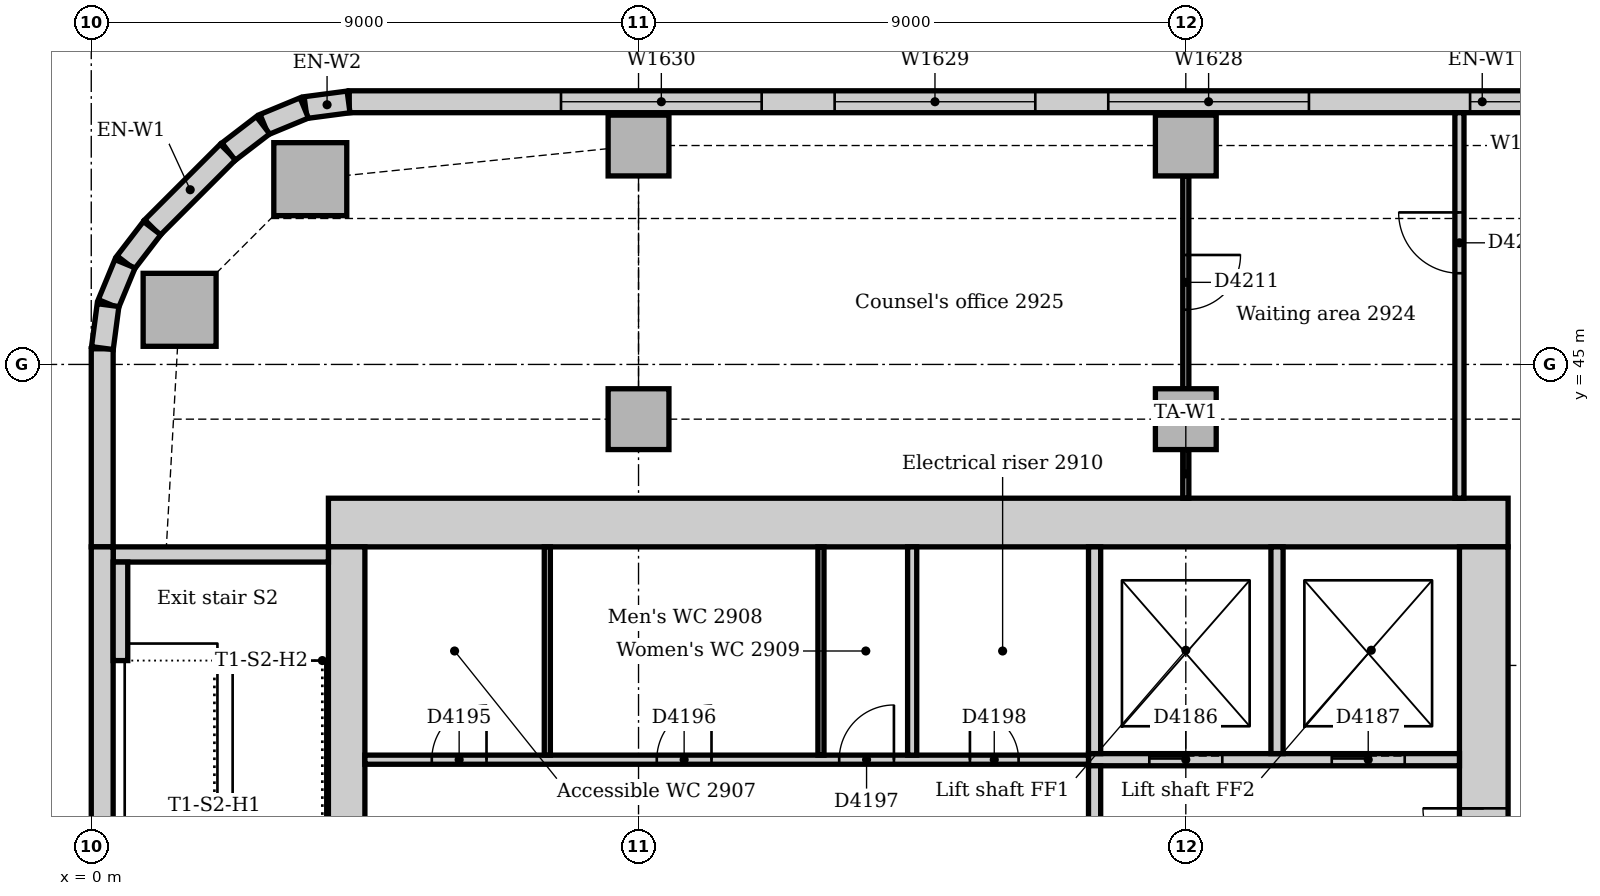
"""IFC4 building model, lengths in metres.
Left out: names, types, materials, properties, quantities, classifications, styles, units other than length and angle.
Written with IfcOpenShell. Run it as: python <this file> out.ifc"""

import sys

from ifc_helpers import new_model, si_unit, direction, frame, frame_2d, origin, origin_2d, place, context, subcontext, project, spatial, rectangle, extrude, element, fill, save


model = new_model("IFC4")
c1 = context("Model", 3, precision=1e-05, world=origin(), true_north=direction((0.0, 1.0)))
c2 = subcontext(c1, "Body", "Model", "MODEL_VIEW")
j1 = project(units=[si_unit("LENGTHUNIT", "METRE"), si_unit("PLANEANGLEUNIT", "RADIAN")], contexts=[c1])
p1 = place(None, origin())
s1 = spatial("IfcSite", under=j1, at=p1, CompositionType="ELEMENT")
p2 = place(p1, origin())
s2 = spatial("IfcBuilding", under=s1, at=p2, CompositionType="ELEMENT")
p3 = place(p2, frame((0.0, 0.0, 124.0)))
s3 = spatial("IfcBuildingStorey", under=s2, at=p3, CompositionType="ELEMENT", Elevation=124.0)
p4 = place(p3, frame((23.3, 42.4, 0.0), z_axis=(0.0, 0.0, 1.0), x_axis=(-1.0, 0.0, 0.0)))
e1 = element("IfcWall", 1, at=p4, inside=s3, PredefinedType="SOLIDWALL", context=c2, shape_type="SweptSolid", body=[
    extrude(rectangle(XDim=19.4, YDim=0.8, at=frame_2d((9.7, 0.0))), origin(), (0.0, 0.0, 1.0), 4.0),
])
p5 = place(p3, frame((22.9, 31.5, 0.0), z_axis=(0.0, 0.0, 1.0), x_axis=(0.0, 1.0, 0.0)))
e2 = element("IfcWall", 2, at=p5, inside=s3, PredefinedType="SOLIDWALL", context=c2, shape_type="SweptSolid", body=[
    extrude(rectangle(XDim=10.5, YDim=0.8, at=frame_2d((5.25, 0.0))), origin(), (0.0, 0.0, 1.0), 4.0),
])
p6 = place(p5, frame((3.15, 0.0, 0.0)))
e3 = element("IfcOpeningElement", 3, at=p6, cuts=e2, PredefinedType="OPENING", context=c2, shape_type="SweptSolid", body=[
    extrude(rectangle(XDim=1.0, YDim=2.1, at=frame_2d((0.5, 1.05))), frame((0.0, 0.41, 0.0), z_axis=(0.0, -1.0, 0.0), x_axis=(1.0, 0.0, 0.0)), (0.0, 0.0, 1.0), 0.82),
])
p7 = place(p5, frame((5.2, 0.0, 0.0)))
e4 = element("IfcOpeningElement", 4, at=p7, cuts=e2, PredefinedType="OPENING", context=c2, shape_type="SweptSolid", body=[
    extrude(rectangle(XDim=1.0, YDim=2.1, at=frame_2d((0.5, 1.05))), frame((0.0, 0.41, 0.0), z_axis=(0.0, -1.0, 0.0), x_axis=(1.0, 0.0, 0.0)), (0.0, 0.0, 1.0), 0.82),
])
p8 = place(p3, frame((4.2, 42.0, 0.0), z_axis=(0.0, 0.0, 1.0), x_axis=(0.0, -1.0, 0.0)))
e5 = element("IfcWall", 5, at=p8, inside=s3, PredefinedType="SOLIDWALL", context=c2, shape_type="SweptSolid", body=[
    extrude(rectangle(XDim=10.5, YDim=0.6, at=frame_2d((5.25, 0.0))), origin(), (0.0, 0.0, 1.0), 4.0),
])
p9 = place(p8, frame((5.3, 0.0, 0.0)))
e6 = element("IfcOpeningElement", 6, at=p9, cuts=e5, PredefinedType="OPENING", context=c2, shape_type="SweptSolid", body=[
    extrude(rectangle(XDim=1.0, YDim=2.1, at=frame_2d((0.5, 1.05))), frame((0.0, 0.31, 0.0), z_axis=(0.0, -1.0, 0.0), x_axis=(1.0, 0.0, 0.0)), (0.0, 0.0, 1.0), 0.62),
])
p10 = place(p3, frame((3.9, 41.875, 0.0), z_axis=(0.0, 0.0, 1.0), x_axis=(-1.0, 0.0, 0.0)))
e7 = element("IfcWall", 7, at=p10, inside=s3, PredefinedType="SOLIDWALL", context=c2, shape_type="SweptSolid", body=[
    extrude(rectangle(XDim=3.54, YDim=0.25, at=frame_2d((1.77, 0.0))), origin(), (0.0, 0.0, 1.0), 4.0),
])
for number, where, z_axis, x_axis in (
    (8, (3.602, 48.047, 0.0), (0.0, 0.0, 1.0), (1.0, 0.0, 0.0)),
    (9, (1.453, 45.898, 0.0), (0.0, 0.0, 1.0), (1.0, 0.0, 0.0)),
):
    element("IfcColumn", number, at=place(p3, frame(where, z_axis=z_axis, x_axis=x_axis)), inside=s3, PredefinedType="COLUMN", context=c2, shape_type="SweptSolid", body=[
        extrude(rectangle(XDim=1.2, YDim=1.2, at=origin_2d()), origin(), (0.0, 0.0, 1.0), 3.85),
    ])
for number, where, z_axis, x_axis in (
    (10, (9.0, 48.6, 0.0), (0.0, 0.0, 1.0), (1.0, 0.0, 0.0)),
    (11, (18.0, 48.6, 0.0), (0.0, 0.0, 1.0), (1.0, 0.0, 0.0)),
    (12, (9.0, 44.1, 0.0), (0.0, 0.0, 1.0), (1.0, 0.0, 0.0)),
    (13, (18.0, 44.1, 0.0), (0.0, 0.0, 1.0), (1.0, 0.0, 0.0)),
):
    element("IfcColumn", number, at=place(p3, frame(where, z_axis=z_axis, x_axis=x_axis)), inside=s3, PredefinedType="COLUMN", context=c2, shape_type="SweptSolid", body=[
        extrude(rectangle(XDim=1.0, YDim=1.0, at=origin_2d()), origin(), (0.0, 0.0, 1.0), 3.85),
    ])
p11 = place(p3, frame((41.507, 49.32, 0.0), z_axis=(0.0, 0.0, 1.0), x_axis=(-1.0, 0.0, 0.0)))
e14 = element("IfcWall", 14, at=p11, inside=s3, PredefinedType="STANDARD", context=c2, shape_type="SweptSolid", body=[
    extrude(rectangle(XDim=37.265, YDim=0.36, at=frame_2d((18.632, 0.0))), origin(), (0.0, 0.0, 1.0), 3.85),
])
p12 = place(p11, frame((3.482, 0.0, 0.9)))
e15 = element("IfcOpeningElement", 15, at=p12, cuts=e14, PredefinedType="OPENING", context=c2, shape_type="SweptSolid", body=[
    extrude(rectangle(XDim=3.3, YDim=1.6, at=frame_2d((1.65, 0.8))), frame((0.0, 0.19, 0.0), z_axis=(0.0, -1.0, 0.0), x_axis=(1.0, 0.0, 0.0)), (0.0, 0.0, 1.0), 0.38),
])
p13 = place(p11, frame((7.982, 0.0, 0.9)))
e16 = element("IfcOpeningElement", 16, at=p13, cuts=e14, PredefinedType="OPENING", context=c2, shape_type="SweptSolid", body=[
    extrude(rectangle(XDim=3.3, YDim=1.6, at=frame_2d((1.65, 0.8))), frame((0.0, 0.19, 0.0), z_axis=(0.0, -1.0, 0.0), x_axis=(1.0, 0.0, 0.0)), (0.0, 0.0, 1.0), 0.38),
])
p14 = place(p11, frame((12.482, 0.0, 0.9)))
e17 = element("IfcOpeningElement", 17, at=p14, cuts=e14, PredefinedType="OPENING", context=c2, shape_type="SweptSolid", body=[
    extrude(rectangle(XDim=3.3, YDim=1.6, at=frame_2d((1.65, 0.8))), frame((0.0, 0.19, 0.0), z_axis=(0.0, -1.0, 0.0), x_axis=(1.0, 0.0, 0.0)), (0.0, 0.0, 1.0), 0.38),
])
p15 = place(p11, frame((17.032, 0.0, 0.9)))
e18 = element("IfcOpeningElement", 18, at=p15, cuts=e14, PredefinedType="OPENING", context=c2, shape_type="SweptSolid", body=[
    extrude(rectangle(XDim=1.8, YDim=1.6, at=frame_2d((0.9, 0.8))), frame((0.0, 0.19, 0.0), z_axis=(0.0, -1.0, 0.0), x_axis=(1.0, 0.0, 0.0)), (0.0, 0.0, 1.0), 0.38),
])
p16 = place(p11, frame((21.482, 0.0, 0.9)))
e19 = element("IfcOpeningElement", 19, at=p16, cuts=e14, PredefinedType="OPENING", context=c2, shape_type="SweptSolid", body=[
    extrude(rectangle(XDim=3.3, YDim=1.6, at=frame_2d((1.65, 0.8))), frame((0.0, 0.19, 0.0), z_axis=(0.0, -1.0, 0.0), x_axis=(1.0, 0.0, 0.0)), (0.0, 0.0, 1.0), 0.38),
])
p17 = place(p11, frame((25.982, 0.0, 0.9)))
e20 = element("IfcOpeningElement", 20, at=p17, cuts=e14, PredefinedType="OPENING", context=c2, shape_type="SweptSolid", body=[
    extrude(rectangle(XDim=3.3, YDim=1.6, at=frame_2d((1.65, 0.8))), frame((0.0, 0.19, 0.0), z_axis=(0.0, -1.0, 0.0), x_axis=(1.0, 0.0, 0.0)), (0.0, 0.0, 1.0), 0.38),
])
p18 = place(p11, frame((30.482, 0.0, 0.9)))
e21 = element("IfcOpeningElement", 21, at=p18, cuts=e14, PredefinedType="OPENING", context=c2, shape_type="SweptSolid", body=[
    extrude(rectangle(XDim=3.3, YDim=1.6, at=frame_2d((1.65, 0.8))), frame((0.0, 0.19, 0.0), z_axis=(0.0, -1.0, 0.0), x_axis=(1.0, 0.0, 0.0)), (0.0, 0.0, 1.0), 0.38),
])
p19 = place(p3, frame((2.249, 48.494, 0.0), z_axis=(0.0, 0.0, 1.0), x_axis=(-0.707106781187, -0.707106781187, 0.0)))
e22 = element("IfcWall", 22, at=p19, inside=s3, PredefinedType="STANDARD", context=c2, shape_type="SweptSolid", body=[
    extrude(rectangle(XDim=1.757, YDim=0.36, at=frame_2d((0.879, 0.0))), origin(), (0.0, 0.0, 1.0), 3.85),
])
p20 = place(p3, frame((0.18, 45.257, 0.0), z_axis=(0.0, 0.0, 1.0), x_axis=(0.0, -1.0, 0.0)))
e23 = element("IfcWall", 23, at=p20, inside=s3, PredefinedType="STANDARD", context=c2, shape_type="SweptSolid", body=[
    extrude(rectangle(XDim=3.257, YDim=0.36, at=frame_2d((1.629, 0.0))), origin(), (0.0, 0.0, 1.0), 3.85),
])
p21 = place(p3, frame((0.18, 42.0, 0.0), z_axis=(0.0, 0.0, 1.0), x_axis=(0.0, -1.0, 0.0)))
e24 = element("IfcWall", 24, at=p21, inside=s3, PredefinedType="STANDARD", context=c2, shape_type="SweptSolid", body=[
    extrude(rectangle(XDim=6.75, YDim=0.36, at=frame_2d((3.375, 0.0))), origin(), (0.0, 0.0, 1.0), 3.85),
])
for number, where, z_axis, x_axis in (
    (25, (4.231, 49.317, 0.0), (0.0, 0.0, 1.0), (-0.991, -0.131, 0.0)),
    (26, (3.503, 49.218, 0.0), (0.0, 0.0, 1.0), (-0.924, -0.383, 0.0)),
):
    element("IfcWall", number, at=place(p3, frame(where, z_axis=z_axis, x_axis=x_axis)), inside=s3, PredefinedType="STANDARD", context=c2, shape_type="SweptSolid", body=[
        extrude(rectangle(XDim=0.713, YDim=0.36, at=frame_2d((0.356, 0.0))), origin(), (0.0, 0.0, 1.0), 3.85),
    ])
for number, where, z_axis, x_axis in (
    (27, (2.825, 48.934, 0.0), (0.0, 0.0, 1.0), (-0.793, -0.609, 0.0)),
    (28, (1.0, 47.241, 0.0), (0.0, 0.0, 1.0), (-0.609, -0.793, 0.0)),
):
    element("IfcWall", number, at=place(p3, frame(where, z_axis=z_axis, x_axis=x_axis)), inside=s3, PredefinedType="STANDARD", context=c2, shape_type="SweptSolid", body=[
        extrude(rectangle(XDim=0.713, YDim=0.36, at=frame_2d((0.357, 0.0))), origin(), (0.0, 0.0, 1.0), 3.85),
    ])
for number, where, z_axis, x_axis in (
    (29, (0.555, 46.656, 0.0), (0.0, 0.0, 1.0), (-0.383, -0.924, 0.0)),
    (30, (0.276, 45.976, 0.0), (0.0, 0.0, 1.0), (-0.131, -0.991, 0.0)),
):
    element("IfcWall", number, at=place(p3, frame(where, z_axis=z_axis, x_axis=x_axis)), inside=s3, PredefinedType="STANDARD", context=c2, shape_type="SweptSolid", body=[
        extrude(rectangle(XDim=0.713, YDim=0.36, at=frame_2d((0.356, 0.0))), origin(), (0.0, 0.0, 1.0), 3.85),
    ])
p22 = place(p3, frame((0.48, 40.13, 0.0), z_axis=(0.0, 0.0, 1.0), x_axis=(0.0, 1.0, 0.0)))
e31 = element("IfcWall", 31, at=p22, inside=s3, PredefinedType="STANDARD", context=c2, shape_type="SweptSolid", body=[
    extrude(rectangle(XDim=1.62, YDim=0.24, at=frame_2d((0.81, 0.0))), origin(), (0.0, 0.0, 1.0), 4.0),
])
p23 = place(p3, frame((16.4, 38.5, 0.0), z_axis=(0.0, 0.0, 1.0), x_axis=(1.0, 0.0, 0.0)))
e32 = element("IfcWall", 32, at=p23, inside=s3, PredefinedType="PARTITIONING", context=c2, shape_type="SweptSolid", body=[
    extrude(rectangle(XDim=6.1, YDim=0.2, at=frame_2d((3.05, 0.0))), origin(), (0.0, 0.0, 1.0), 3.85),
])
p24 = place(p23, frame((1.0, 0.0, 0.0)))
e33 = element("IfcOpeningElement", 33, at=p24, cuts=e32, PredefinedType="OPENING", context=c2, shape_type="SweptSolid", body=[
    extrude(rectangle(XDim=1.2, YDim=2.1, at=frame_2d((0.6, 1.05))), frame((0.0, 0.11, 0.0), z_axis=(0.0, -1.0, 0.0), x_axis=(1.0, 0.0, 0.0)), (0.0, 0.0, 1.0), 0.22),
])
p25 = place(p23, frame((4.0, 0.0, 0.0)))
e34 = element("IfcOpeningElement", 34, at=p25, cuts=e32, PredefinedType="OPENING", context=c2, shape_type="SweptSolid", body=[
    extrude(rectangle(XDim=1.2, YDim=2.1, at=frame_2d((0.6, 1.05))), frame((0.0, 0.11, 0.0), z_axis=(0.0, -1.0, 0.0), x_axis=(1.0, 0.0, 0.0)), (0.0, 0.0, 1.0), 0.22),
])
p26 = place(p3, frame((16.5, 35.85, 0.0), z_axis=(0.0, 0.0, 1.0), x_axis=(0.0, 1.0, 0.0)))
e35 = element("IfcWall", 35, at=p26, inside=s3, PredefinedType="PARTITIONING", context=c2, shape_type="SweptSolid", body=[
    extrude(rectangle(XDim=2.55, YDim=0.2, at=frame_2d((1.275, 0.0))), origin(), (0.0, 0.0, 1.0), 3.85),
])
for number, where, z_axis, x_axis in (
    (36, (16.5, 38.6, 0.0), (0.0, 0.0, 1.0), (0.0, 1.0, 0.0)),
    (37, (19.5, 38.6, 0.0), (0.0, 0.0, 1.0), (0.0, 1.0, 0.0)),
):
    element("IfcWall", number, at=place(p3, frame(where, z_axis=z_axis, x_axis=x_axis)), inside=s3, PredefinedType="PARTITIONING", context=c2, shape_type="SweptSolid", body=[
        extrude(rectangle(XDim=3.4, YDim=0.2, at=frame_2d((1.7, 0.0))), origin(), (0.0, 0.0, 1.0), 3.85),
    ])
p27 = place(p3, frame((4.5, 38.5, 0.0), z_axis=(0.0, 0.0, 1.0), x_axis=(1.0, 0.0, 0.0)))
e38 = element("IfcWall", 38, at=p27, inside=s3, PredefinedType="PARTITIONING", context=c2, shape_type="SweptSolid", body=[
    extrude(rectangle(XDim=11.9, YDim=0.15, at=frame_2d((5.95, 0.0))), origin(), (0.0, 0.0, 1.0), 3.85),
])
p28 = place(p27, frame((1.1, 0.0, 0.0)))
e39 = element("IfcOpeningElement", 39, at=p28, cuts=e38, PredefinedType="OPENING", context=c2, shape_type="SweptSolid", body=[
    extrude(rectangle(XDim=0.9, YDim=2.1, at=frame_2d((0.45, 1.05))), frame((0.0, 0.085, 0.0), z_axis=(0.0, -1.0, 0.0), x_axis=(1.0, 0.0, 0.0)), (0.0, 0.0, 1.0), 0.17),
])
p29 = place(p27, frame((4.8, 0.0, 0.0)))
e40 = element("IfcOpeningElement", 40, at=p29, cuts=e38, PredefinedType="OPENING", context=c2, shape_type="SweptSolid", body=[
    extrude(rectangle(XDim=0.9, YDim=2.1, at=frame_2d((0.45, 1.05))), frame((0.0, 0.085, 0.0), z_axis=(0.0, -1.0, 0.0), x_axis=(1.0, 0.0, 0.0)), (0.0, 0.0, 1.0), 0.17),
])
p30 = place(p27, frame((7.8, 0.0, 0.0)))
e41 = element("IfcOpeningElement", 41, at=p30, cuts=e38, PredefinedType="OPENING", context=c2, shape_type="SweptSolid", body=[
    extrude(rectangle(XDim=0.9, YDim=2.1, at=frame_2d((0.45, 1.05))), frame((0.0, 0.085, 0.0), z_axis=(0.0, -1.0, 0.0), x_axis=(1.0, 0.0, 0.0)), (0.0, 0.0, 1.0), 0.17),
])
p31 = place(p27, frame((9.95, 0.0, 0.0)))
e42 = element("IfcOpeningElement", 42, at=p31, cuts=e38, PredefinedType="OPENING", context=c2, shape_type="SweptSolid", body=[
    extrude(rectangle(XDim=0.8, YDim=2.1, at=frame_2d((0.4, 1.05))), frame((0.0, 0.085, 0.0), z_axis=(0.0, -1.0, 0.0), x_axis=(1.0, 0.0, 0.0)), (0.0, 0.0, 1.0), 0.17),
])
p32 = place(p3, frame((22.5, 42.8, 0.0), z_axis=(0.0, 0.0, 1.0), x_axis=(0.0, 1.0, 0.0)))
e43 = element("IfcWall", 43, at=p32, inside=s3, PredefinedType="PARTITIONING", context=c2, shape_type="SweptSolid", body=[
    extrude(rectangle(XDim=6.34, YDim=0.15, at=frame_2d((3.17, 0.0))), origin(), (0.0, 0.0, 1.0), 3.85),
])
p33 = place(p32, frame((3.7, 0.0, 0.0)))
e44 = element("IfcOpeningElement", 44, at=p33, cuts=e43, PredefinedType="OPENING", context=c2, shape_type="SweptSolid", body=[
    extrude(rectangle(XDim=1.0, YDim=2.1, at=frame_2d((0.5, 1.05))), frame((0.0, 0.085, 0.0), z_axis=(0.0, -1.0, 0.0), x_axis=(1.0, 0.0, 0.0)), (0.0, 0.0, 1.0), 0.17),
])
p34 = place(p3, frame((13.5, 38.575, 0.0), z_axis=(0.0, 0.0, 1.0), x_axis=(0.0, 1.0, 0.0)))
e45 = element("IfcWall", 45, at=p34, inside=s3, PredefinedType="PARTITIONING", context=c2, shape_type="SweptSolid", body=[
    extrude(rectangle(XDim=3.425, YDim=0.15, at=frame_2d((1.712, 0.0))), origin(), (0.0, 0.0, 1.0), 3.85),
])
p35 = place(p3, frame((18.0, 42.8, 0.0), z_axis=(0.0, 0.0, 1.0), x_axis=(0.0, 1.0, 0.0)))
e46 = element("IfcWall", 46, at=p35, inside=s3, PredefinedType="PARTITIONING", context=c2, shape_type="SweptSolid", body=[
    extrude(rectangle(XDim=0.8, YDim=0.1, at=frame_2d((0.4, 0.0))), origin(), (0.0, 0.0, 1.0), 3.85),
])
p36 = place(p3, frame((18.0, 44.6, 0.0), z_axis=(0.0, 0.0, 1.0), x_axis=(0.0, 1.0, 0.0)))
e47 = element("IfcWall", 47, at=p36, inside=s3, PredefinedType="PARTITIONING", context=c2, shape_type="SweptSolid", body=[
    extrude(rectangle(XDim=3.5, YDim=0.1, at=frame_2d((1.75, 0.0))), origin(), (0.0, 0.0, 1.0), 3.652),
])
p37 = place(p36, frame((1.3, 0.0, 0.0)))
e48 = element("IfcOpeningElement", 48, at=p37, cuts=e47, PredefinedType="OPENING", context=c2, shape_type="SweptSolid", body=[
    extrude(rectangle(XDim=0.9, YDim=2.1, at=frame_2d((0.45, 1.05))), frame((0.0, 0.06, 0.0), z_axis=(0.0, -1.0, 0.0), x_axis=(1.0, 0.0, 0.0)), (0.0, 0.0, 1.0), 0.12),
])
for number, where, z_axis, x_axis in (
    (49, (7.5, 38.575, 0.0), (0.0, 0.0, 1.0), (0.0, 1.0, 0.0)),
    (50, (12.0, 38.575, 0.0), (0.0, 0.0, 1.0), (0.0, 1.0, 0.0)),
):
    element("IfcWall", number, at=place(p3, frame(where, z_axis=z_axis, x_axis=x_axis)), inside=s3, PredefinedType="PARTITIONING", context=c2, shape_type="SweptSolid", body=[
        extrude(rectangle(XDim=3.425, YDim=0.1, at=frame_2d((1.712, 0.0))), origin(), (0.0, 0.0, 1.0), 3.85),
    ])
p38 = place(p15, origin())
e51 = element("IfcWindow", 51, at=p38, inside=s3, PartitioningType="SINGLE_PANEL", PredefinedType="WINDOW", context=c2, shape_type="SweptSolid", body=[
    extrude(rectangle(XDim=1.8, YDim=1.6, at=frame_2d((0.9, 0.8))), frame((0.0, 0.13, 0.0), z_axis=(0.0, -1.0, 0.0), x_axis=(1.0, 0.0, 0.0)), (0.0, 0.0, 1.0), 0.06),
])
fill(e18, e51)
p39 = place(p16, origin())
e52 = element("IfcWindow", 52, at=p39, inside=s3, PartitioningType="SINGLE_PANEL", PredefinedType="WINDOW", context=c2, shape_type="SweptSolid", body=[
    extrude(rectangle(XDim=3.3, YDim=1.6, at=frame_2d((1.65, 0.8))), frame((0.0, 0.13, 0.0), z_axis=(0.0, -1.0, 0.0), x_axis=(1.0, 0.0, 0.0)), (0.0, 0.0, 1.0), 0.06),
])
fill(e19, e52)
p40 = place(p17, origin())
e53 = element("IfcWindow", 53, at=p40, inside=s3, PartitioningType="SINGLE_PANEL", PredefinedType="WINDOW", context=c2, shape_type="SweptSolid", body=[
    extrude(rectangle(XDim=3.3, YDim=1.6, at=frame_2d((1.65, 0.8))), frame((0.0, 0.13, 0.0), z_axis=(0.0, -1.0, 0.0), x_axis=(1.0, 0.0, 0.0)), (0.0, 0.0, 1.0), 0.06),
])
fill(e20, e53)
p41 = place(p18, origin())
e54 = element("IfcWindow", 54, at=p41, inside=s3, PartitioningType="SINGLE_PANEL", PredefinedType="WINDOW", context=c2, shape_type="SweptSolid", body=[
    extrude(rectangle(XDim=3.3, YDim=1.6, at=frame_2d((1.65, 0.8))), frame((0.0, 0.13, 0.0), z_axis=(0.0, -1.0, 0.0), x_axis=(1.0, 0.0, 0.0)), (0.0, 0.0, 1.0), 0.06),
])
fill(e21, e54)
p42 = place(p24, origin())
e55 = element("IfcDoor", 55, at=p42, inside=s3, OperationType="SLIDING_TO_LEFT", PredefinedType="DOOR", context=c2, shape_type="SweptSolid", body=[
    extrude(rectangle(XDim=1.2, YDim=2.1, at=frame_2d((0.6, 1.05))), frame((0.0, 0.025, 0.0), z_axis=(0.0, -1.0, 0.0), x_axis=(1.0, 0.0, 0.0)), (0.0, 0.0, 1.0), 0.05),
])
fill(e33, e55)
p43 = place(p25, origin())
e56 = element("IfcDoor", 56, at=p43, inside=s3, OperationType="SLIDING_TO_LEFT", PredefinedType="DOOR", context=c2, shape_type="SweptSolid", body=[
    extrude(rectangle(XDim=1.2, YDim=2.1, at=frame_2d((0.6, 1.05))), frame((0.0, 0.025, 0.0), z_axis=(0.0, -1.0, 0.0), x_axis=(1.0, 0.0, 0.0)), (0.0, 0.0, 1.0), 0.05),
])
fill(e34, e56)
p44 = place(p7, origin())
e57 = element("IfcDoor", 57, at=p44, inside=s3, OperationType="SINGLE_SWING_RIGHT", PredefinedType="DOOR", context=c2, shape_type="SweptSolid", body=[
    extrude(rectangle(XDim=1.0, YDim=2.1, at=frame_2d((0.5, 1.05))), frame((0.0, 0.025, 0.0), z_axis=(0.0, -1.0, 0.0), x_axis=(1.0, 0.0, 0.0)), (0.0, 0.0, 1.0), 0.05),
])
fill(e4, e57)
p45 = place(p28, origin())
e58 = element("IfcDoor", 58, at=p45, inside=s3, OperationType="SINGLE_SWING_RIGHT", PredefinedType="DOOR", context=c2, shape_type="SweptSolid", body=[
    extrude(rectangle(XDim=0.9, YDim=2.1, at=frame_2d((0.45, 1.05))), frame((0.0, 0.025, 0.0), z_axis=(0.0, -1.0, 0.0), x_axis=(1.0, 0.0, 0.0)), (0.0, 0.0, 1.0), 0.05),
])
fill(e39, e58)
p46 = place(p29, origin())
e59 = element("IfcDoor", 59, at=p46, inside=s3, OperationType="SINGLE_SWING_RIGHT", PredefinedType="DOOR", context=c2, shape_type="SweptSolid", body=[
    extrude(rectangle(XDim=0.9, YDim=2.1, at=frame_2d((0.45, 1.05))), frame((0.0, 0.025, 0.0), z_axis=(0.0, -1.0, 0.0), x_axis=(1.0, 0.0, 0.0)), (0.0, 0.0, 1.0), 0.05),
])
fill(e40, e59)
p47 = place(p30, origin())
e60 = element("IfcDoor", 60, at=p47, inside=s3, OperationType="SINGLE_SWING_RIGHT", PredefinedType="DOOR", context=c2, shape_type="SweptSolid", body=[
    extrude(rectangle(XDim=0.9, YDim=2.1, at=frame_2d((0.45, 1.05))), frame((0.0, 0.025, 0.0), z_axis=(0.0, -1.0, 0.0), x_axis=(1.0, 0.0, 0.0)), (0.0, 0.0, 1.0), 0.05),
])
fill(e41, e60)
p48 = place(p31, origin())
e61 = element("IfcDoor", 61, at=p48, inside=s3, OperationType="SINGLE_SWING_LEFT", PredefinedType="DOOR", context=c2, shape_type="SweptSolid", body=[
    extrude(rectangle(XDim=0.8, YDim=2.1, at=frame_2d((0.4, 1.05))), frame((0.0, 0.025, 0.0), z_axis=(0.0, -1.0, 0.0), x_axis=(1.0, 0.0, 0.0)), (0.0, 0.0, 1.0), 0.05),
])
fill(e42, e61)
p49 = place(p33, origin())
e62 = element("IfcDoor", 62, at=p49, inside=s3, OperationType="SINGLE_SWING_RIGHT", PredefinedType="DOOR", context=c2, shape_type="SweptSolid", body=[
    extrude(rectangle(XDim=1.0, YDim=2.1, at=frame_2d((0.5, 1.05))), frame((0.0, 0.025, 0.0), z_axis=(0.0, -1.0, 0.0), x_axis=(1.0, 0.0, 0.0)), (0.0, 0.0, 1.0), 0.05),
])
fill(e44, e62)
p50 = place(p37, frame((0.9, 0.0, 0.0), z_axis=(0.0, 0.0, 1.0), x_axis=(-1.0, 0.0, 0.0)))
e63 = element("IfcDoor", 63, at=p50, inside=s3, OperationType="SINGLE_SWING_LEFT", PredefinedType="DOOR", context=c2, shape_type="SweptSolid", body=[
    extrude(rectangle(XDim=0.9, YDim=2.1, at=frame_2d((0.45, 1.05))), frame((0.0, 0.025, 0.0), z_axis=(0.0, -1.0, 0.0), x_axis=(1.0, 0.0, 0.0)), (0.0, 0.0, 1.0), 0.05),
])
fill(e48, e63)
save(model, sys.argv[1])
